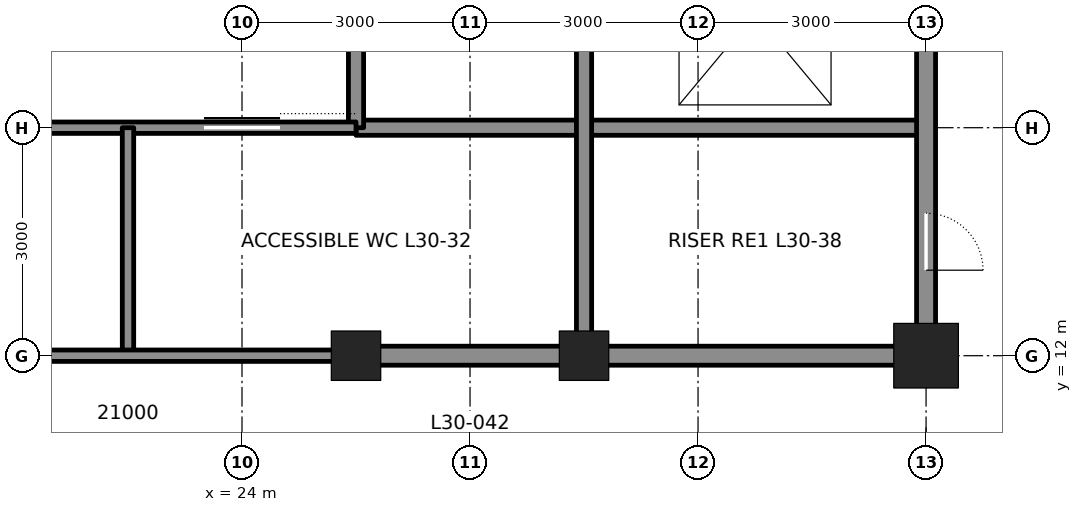
"""IFC4 building model, lengths in metres.
Left out: names, types, materials, properties, quantities, classifications, styles, units other than length and angle.
Written with IfcOpenShell. Run it as: python <this file> out.ifc"""

import sys

from ifc_helpers import new_model, si_unit, direction, frame, frame_2d, origin, origin_2d, place, context, subcontext, project, spatial, rectangle, hollow_rectangle, extrude, element, fill, save


model = new_model("IFC4")
c1 = context("Model", 3, precision=1e-05, world=origin(), true_north=direction((0.0, 1.0)))
c2 = subcontext(c1, "Body", "Model", "MODEL_VIEW")
j1 = project(units=[si_unit("LENGTHUNIT", "METRE"), si_unit("PLANEANGLEUNIT", "RADIAN")], contexts=[c1])
p1 = place(None, origin())
s1 = spatial("IfcSite", under=j1, at=p1, CompositionType="ELEMENT")
p2 = place(p1, origin())
s2 = spatial("IfcBuilding", under=s1, at=p2, CompositionType="ELEMENT")
p3 = place(p2, frame((0.0, 0.0, 140.4)))
s3 = spatial("IfcBuildingStorey", under=s2, at=p3, CompositionType="ELEMENT", Elevation=140.4)
for number, where, z_axis, x_axis in (
    (1, (25.5, 12.0, 0.0), (0.0, 0.0, 1.0), (1.0, 0.0, 0.0)),
    (2, (28.5, 12.0, 0.0), (0.0, 0.0, 1.0), (1.0, 0.0, 0.0)),
):
    element("IfcColumn", number, at=place(p3, frame(where, z_axis=z_axis, x_axis=x_axis)), inside=s3, PredefinedType="COLUMN", context=c2, shape_type="SweptSolid", body=[
        extrude(hollow_rectangle(XDim=0.65, YDim=0.65, WallThickness=0.065, at=origin_2d()), origin(), (0.0, 0.0, 1.0), 4.2),
    ])
p4 = place(p3, frame((33.0, 12.0, 0.0), z_axis=(0.0, 0.0, 1.0), x_axis=(1.0, 0.0, 0.0)))
e3 = element("IfcColumn", 3, at=p4, inside=s3, PredefinedType="COLUMN", context=c2, shape_type="SweptSolid", body=[
    extrude(hollow_rectangle(XDim=0.85, YDim=0.85, WallThickness=0.085, at=origin_2d()), origin(), (0.0, 0.0, 1.0), 4.2),
])
p5 = place(p3, frame((25.75, 12.0, 0.0), z_axis=(0.0, 0.0, 1.0), x_axis=(1.0, 0.0, 0.0)))
e4 = element("IfcWall", 4, at=p5, inside=s3, PredefinedType="SOLIDWALL", context=c2, shape_type="SweptSolid", body=[
    extrude(rectangle(XDim=2.5, YDim=0.25, at=frame_2d((1.25, 0.0))), origin(), (0.0, 0.0, 1.0), 3.182),
])
p6 = place(p3, frame((28.75, 12.0, 0.0), z_axis=(0.0, 0.0, 1.0), x_axis=(1.0, 0.0, 0.0)))
e5 = element("IfcWall", 5, at=p6, inside=s3, PredefinedType="SOLIDWALL", context=c2, shape_type="SweptSolid", body=[
    extrude(rectangle(XDim=4.0, YDim=0.25, at=frame_2d((2.0, 0.0))), origin(), (0.0, 0.0, 1.0), 3.182),
])
p7 = place(p3, frame((25.5, 15.0, 0.0), z_axis=(0.0, 0.0, 1.0), x_axis=(1.0, 0.0, 0.0)))
e6 = element("IfcWall", 6, at=p7, inside=s3, PredefinedType="SOLIDWALL", context=c2, shape_type="SweptSolid", body=[
    extrude(rectangle(XDim=7.5, YDim=0.2, at=frame_2d((3.75, 0.0))), origin(), (0.0, 0.0, 1.0), 4.04),
])
p8 = place(p3, frame((25.5, 15.0, 0.0), z_axis=(0.0, 0.0, 1.0), x_axis=(0.0, 1.0, 0.0)))
e7 = element("IfcWall", 7, at=p8, inside=s3, PredefinedType="SOLIDWALL", context=c2, shape_type="SweptSolid", body=[
    extrude(rectangle(XDim=12.0, YDim=0.2, at=frame_2d((6.0, 0.0))), origin(), (0.0, 0.0, 1.0), 3.065),
])
p9 = place(p3, frame((28.5, 12.25, 0.0), z_axis=(0.0, 0.0, 1.0), x_axis=(0.0, 1.0, 0.0)))
e8 = element("IfcWall", 8, at=p9, inside=s3, PredefinedType="SOLIDWALL", context=c2, shape_type="SweptSolid", body=[
    extrude(rectangle(XDim=8.5, YDim=0.2, at=frame_2d((4.25, 0.0))), origin(), (0.0, 0.0, 1.0), 3.113),
])
p10 = place(p3, frame((33.0, 12.25, 0.0), z_axis=(0.0, 0.0, 1.0), x_axis=(0.0, 1.0, 0.0)))
e9 = element("IfcWall", 9, at=p10, inside=s3, PredefinedType="SOLIDWALL", context=c2, shape_type="SweptSolid", body=[
    extrude(rectangle(XDim=8.5, YDim=0.25, at=frame_2d((4.25, 0.0))), origin(), (0.0, 0.0, 1.0), 3.113),
])
p11 = place(p10, frame((6.65, 0.0, 0.0)))
e10 = element("IfcOpeningElement", 10, at=p11, cuts=e9, PredefinedType="OPENING", context=c2, shape_type="SweptSolid", body=[
    extrude(rectangle(XDim=1.2, YDim=2.1, at=frame_2d((0.6, 1.05))), frame((0.0, 0.135, 0.0), z_axis=(0.0, -1.0, 0.0), x_axis=(1.0, 0.0, 0.0)), (0.0, 0.0, 1.0), 0.27),
])
p12 = place(p10, frame((0.875, 0.0, 0.0)))
e11 = element("IfcOpeningElement", 11, at=p12, cuts=e9, PredefinedType="OPENING", context=c2, shape_type="SweptSolid", body=[
    extrude(rectangle(XDim=0.75, YDim=2.1, at=frame_2d((0.375, 1.05))), frame((0.0, 0.135, 0.0), z_axis=(0.0, -1.0, 0.0), x_axis=(1.0, 0.0, 0.0)), (0.0, 0.0, 1.0), 0.27),
])
p13 = place(p3, frame((19.5, 15.0, 0.0), z_axis=(0.0, 0.0, 1.0), x_axis=(1.0, 0.0, 0.0)))
e12 = element("IfcWall", 12, at=p13, inside=s3, PredefinedType="PARTITIONING", context=c2, shape_type="SweptSolid", body=[
    extrude(rectangle(XDim=6.0, YDim=0.15, at=frame_2d((3.0, 0.0))), origin(), (0.0, 0.0, 1.0), 4.04),
])
p14 = place(p13, frame((4.0, 0.0, 0.0)))
e13 = element("IfcOpeningElement", 13, at=p14, cuts=e12, PredefinedType="OPENING", context=c2, shape_type="SweptSolid", body=[
    extrude(rectangle(XDim=1.0, YDim=2.1, at=frame_2d((0.5, 1.05))), frame((0.0, 0.085, 0.0), z_axis=(0.0, -1.0, 0.0), x_axis=(1.0, 0.0, 0.0)), (0.0, 0.0, 1.0), 0.17),
])
p15 = place(p13, frame((1.05, 0.0, 0.0)))
e14 = element("IfcOpeningElement", 14, at=p15, cuts=e12, PredefinedType="OPENING", context=c2, shape_type="SweptSolid", body=[
    extrude(rectangle(XDim=0.9, YDim=2.1, at=frame_2d((0.45, 1.05))), frame((0.0, 0.085, 0.0), z_axis=(0.0, -1.0, 0.0), x_axis=(1.0, 0.0, 0.0)), (0.0, 0.0, 1.0), 0.17),
])
p16 = place(p3, frame((22.5, 15.0, 0.0), z_axis=(0.0, 0.0, 1.0), x_axis=(0.0, -1.0, 0.0)))
e15 = element("IfcWall", 15, at=p16, inside=s3, PredefinedType="PARTITIONING", context=c2, shape_type="SweptSolid", body=[
    extrude(rectangle(XDim=3.0, YDim=0.15, at=frame_2d((1.5, 0.0))), origin(), (0.0, 0.0, 1.0), 4.04),
])
p17 = place(p3, frame((19.5, 12.0, 0.0), z_axis=(0.0, 0.0, 1.0), x_axis=(1.0, 0.0, 0.0)))
e16 = element("IfcWall", 16, at=p17, inside=s3, PredefinedType="PARTITIONING", context=c2, shape_type="SweptSolid", body=[
    extrude(rectangle(XDim=6.0, YDim=0.15, at=frame_2d((3.0, 0.0))), origin(), (0.0, 0.0, 1.0), 3.182),
])
p18 = place(p12, frame((0.75, 0.0, 0.0), z_axis=(0.0, 0.0, 1.0), x_axis=(-1.0, 0.0, 0.0)))
e17 = element("IfcDoor", 17, at=p18, inside=s3, OperationType="SINGLE_SWING_RIGHT", PredefinedType="DOOR", context=c2, shape_type="SweptSolid", body=[
    extrude(rectangle(XDim=0.75, YDim=2.1, at=frame_2d((0.375, 1.05))), frame((0.0, 0.025, 0.0), z_axis=(0.0, -1.0, 0.0), x_axis=(1.0, 0.0, 0.0)), (0.0, 0.0, 1.0), 0.05),
])
fill(e11, e17)
p19 = place(p14, origin())
e18 = element("IfcDoor", 18, at=p19, inside=s3, OperationType="SLIDING_TO_LEFT", PredefinedType="DOOR", context=c2, shape_type="SweptSolid", body=[
    extrude(rectangle(XDim=1.0, YDim=2.1, at=frame_2d((0.5, 1.05))), frame((0.0, 0.025, 0.0), z_axis=(0.0, -1.0, 0.0), x_axis=(1.0, 0.0, 0.0)), (0.0, 0.0, 1.0), 0.05),
])
fill(e13, e18)
save(model, sys.argv[1])
